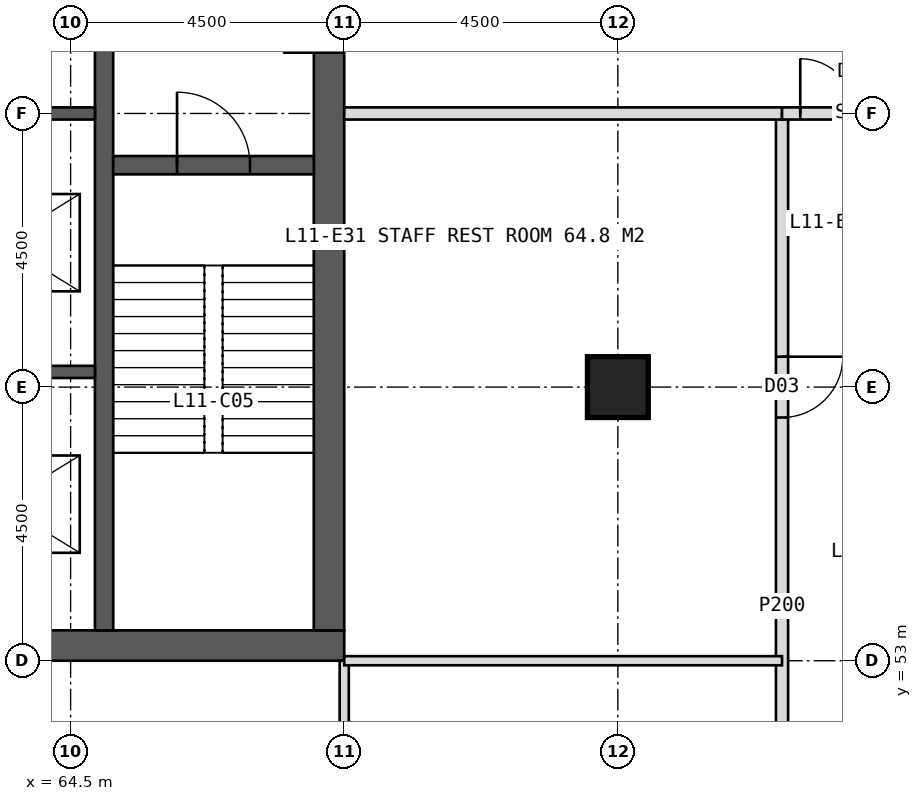
"""IFC4 building model, lengths in metres.
Left out: names, types, materials, properties, quantities, classifications, styles, units other than length and angle.
Written with IfcOpenShell. Run it as: python <this file> out.ifc"""

import sys

from ifc_helpers import new_model, si_unit, direction, frame, frame_2d, origin, origin_2d, place, context, subcontext, project, spatial, rectangle, hollow_rectangle, extrude, element, fill, save


model = new_model("IFC4")
c1 = context("Model", 3, precision=1e-05, world=origin(), true_north=direction((0.0, 1.0)))
c2 = subcontext(c1, "Body", "Model", "MODEL_VIEW")
j1 = project(units=[si_unit("LENGTHUNIT", "METRE"), si_unit("PLANEANGLEUNIT", "RADIAN")], contexts=[c1])
p1 = place(None, origin())
s1 = spatial("IfcSite", under=j1, at=p1, CompositionType="ELEMENT")
p2 = place(p1, origin())
s2 = spatial("IfcBuilding", under=s1, at=p2, CompositionType="ELEMENT")
p3 = place(p2, frame((0.0, 0.0, 51.0)))
s3 = spatial("IfcBuildingStorey", under=s2, at=p3, CompositionType="ELEMENT", Elevation=51.0)
p4 = place(p3, frame((51.0, 53.25, 0.0), z_axis=(0.0, 0.0, 1.0), x_axis=(1.0, 0.0, 0.0)))
e1 = element("IfcWall", 1, at=p4, inside=s3, PredefinedType="SHEAR", context=c2, shape_type="SweptSolid", body=[
    extrude(rectangle(XDim=18.0, YDim=0.5, at=frame_2d((9.0, 0.0))), origin(), (0.0, 0.0, 1.0), 4.0),
])
p5 = place(p4, frame((8.1, 0.0, 0.0)))
e2 = element("IfcOpeningElement", 2, at=p5, cuts=e1, PredefinedType="OPENING", context=c2, shape_type="SweptSolid", body=[
    extrude(rectangle(XDim=1.8, YDim=2.2, at=frame_2d((0.9, 1.1))), frame((0.0, 0.26, 0.0), z_axis=(0.0, -1.0, 0.0), x_axis=(1.0, 0.0, 0.0)), (0.0, 0.0, 1.0), 0.52),
])
p6 = place(p3, frame((68.75, 53.5, 0.0), z_axis=(0.0, 0.0, 1.0), x_axis=(0.0, 1.0, 0.0)))
e3 = element("IfcWall", 3, at=p6, inside=s3, PredefinedType="SHEAR", context=c2, shape_type="SweptSolid", body=[
    extrude(rectangle(XDim=17.0, YDim=0.5, at=frame_2d((8.5, 0.0))), origin(), (0.0, 0.0, 1.0), 4.0),
])
p7 = place(p6, frame((9.5, 0.0, 0.0)))
e4 = element("IfcOpeningElement", 4, at=p7, cuts=e3, PredefinedType="OPENING", context=c2, shape_type="SweptSolid", body=[
    extrude(rectangle(XDim=1.5, YDim=2.2, at=frame_2d((0.75, 1.1))), frame((0.0, 0.26, 0.0), z_axis=(0.0, -1.0, 0.0), x_axis=(1.0, 0.0, 0.0)), (0.0, 0.0, 1.0), 0.52),
])
p8 = place(p3, frame((65.05, 53.5, 0.0), z_axis=(0.0, 0.0, 1.0), x_axis=(0.0, 1.0, 0.0)))
e5 = element("IfcWall", 5, at=p8, inside=s3, PredefinedType="SHEAR", context=c2, shape_type="SweptSolid", body=[
    extrude(rectangle(XDim=17.0, YDim=0.3, at=frame_2d((8.5, 0.0))), origin(), (0.0, 0.0, 1.0), 4.0),
])
for number, where, z_axis, x_axis in (
    (6, (61.85, 57.75, 0.0), (0.0, 0.0, 1.0), (1.0, 0.0, 0.0)),
    (7, (61.85, 62.0, 0.0), (0.0, 0.0, 1.0), (1.0, 0.0, 0.0)),
):
    element("IfcWall", number, at=place(p3, frame(where, z_axis=z_axis, x_axis=x_axis)), inside=s3, PredefinedType="SHEAR", context=c2, shape_type="SweptSolid", body=[
        extrude(rectangle(XDim=3.05, YDim=0.2, at=frame_2d((1.525, 0.0))), origin(), (0.0, 0.0, 1.0), 4.0),
    ])
p9 = place(p3, frame((65.2, 61.15, 0.0), z_axis=(0.0, 0.0, 1.0), x_axis=(1.0, 0.0, 0.0)))
e8 = element("IfcWall", 8, at=p9, inside=s3, PredefinedType="SHEAR", context=c2, shape_type="SweptSolid", body=[
    extrude(rectangle(XDim=3.3, YDim=0.3, at=frame_2d((1.65, 0.0))), origin(), (0.0, 0.0, 1.0), 4.0),
])
p10 = place(p9, frame((1.05, 0.0, 0.0)))
e9 = element("IfcOpeningElement", 9, at=p10, cuts=e8, PredefinedType="OPENING", context=c2, shape_type="SweptSolid", body=[
    extrude(rectangle(XDim=1.2, YDim=2.1, at=frame_2d((0.6, 1.05))), frame((0.0, 0.16, 0.0), z_axis=(0.0, -1.0, 0.0), x_axis=(1.0, 0.0, 0.0)), (0.0, 0.0, 1.0), 0.32),
])
p11 = place(p3, frame((73.5, 57.5, 0.0), z_axis=(0.0, 0.0, 1.0), x_axis=(1.0, 0.0, 0.0)))
e10 = element("IfcColumn", 10, at=p11, inside=s3, PredefinedType="COLUMN", context=c2, shape_type="SweptSolid", body=[
    extrude(hollow_rectangle(XDim=1.0, YDim=1.0, WallThickness=0.1, at=origin_2d()), origin(), (0.0, 0.0, 1.0), 4.0),
])
p12 = place(p3, frame((69.0, 53.0, 0.0), z_axis=(0.0, 0.0, 1.0), x_axis=(0.0, -1.0, 0.0)))
e11 = element("IfcWall", 11, at=p12, inside=s3, PredefinedType="PARTITIONING", context=c2, shape_type="SweptSolid", body=[
    extrude(rectangle(XDim=7.2, YDim=0.15, at=frame_2d((3.6, 0.0))), origin(), (0.0, 0.0, 1.0), 3.75),
])
p13 = place(p3, frame((76.2, 62.0, 0.0), z_axis=(0.0, 0.0, 1.0), x_axis=(0.0, -1.0, 0.0)))
e12 = element("IfcWall", 12, at=p13, inside=s3, PredefinedType="PARTITIONING", context=c2, shape_type="SweptSolid", body=[
    extrude(rectangle(XDim=16.2, YDim=0.2, at=frame_2d((8.1, 0.0))), origin(), (0.0, 0.0, 1.0), 3.75),
])
p14 = place(p13, frame((4.0, 0.0, 0.0)))
e13 = element("IfcOpeningElement", 13, at=p14, cuts=e12, PredefinedType="OPENING", context=c2, shape_type="SweptSolid", body=[
    extrude(rectangle(XDim=1.0, YDim=2.1, at=frame_2d((0.5, 1.05))), frame((0.0, 0.11, 0.0), z_axis=(0.0, -1.0, 0.0), x_axis=(1.0, 0.0, 0.0)), (0.0, 0.0, 1.0), 0.22),
])
p15 = place(p13, frame((12.1, 0.0, 0.0)))
e14 = element("IfcOpeningElement", 14, at=p15, cuts=e12, PredefinedType="OPENING", context=c2, shape_type="SweptSolid", body=[
    extrude(rectangle(XDim=1.0, YDim=2.1, at=frame_2d((0.5, 1.05))), frame((0.0, 0.11, 0.0), z_axis=(0.0, -1.0, 0.0), x_axis=(1.0, 0.0, 0.0)), (0.0, 0.0, 1.0), 0.22),
])
p16 = place(p3, frame((69.0, 62.0, 0.0), z_axis=(0.0, 0.0, 1.0), x_axis=(1.0, 0.0, 0.0)))
e15 = element("IfcWall", 15, at=p16, inside=s3, PredefinedType="SOLIDWALL", context=c2, shape_type="SweptSolid", body=[
    extrude(rectangle(XDim=7.2, YDim=0.2, at=frame_2d((3.6, 0.0))), origin(), (0.0, 0.0, 1.0), 2.75),
])
p17 = place(p3, frame((69.0, 53.0, 0.0), z_axis=(0.0, 0.0, 1.0), x_axis=(1.0, 0.0, 0.0)))
e16 = element("IfcWall", 16, at=p17, inside=s3, PredefinedType="PARTITIONING", context=c2, shape_type="SweptSolid", body=[
    extrude(rectangle(XDim=7.2, YDim=0.15, at=frame_2d((3.6, 0.0))), origin(), (0.0, 0.0, 1.0), 3.75),
])
p18 = place(p3, frame((76.2, 62.0, 0.0), z_axis=(0.0, 0.0, 1.0), x_axis=(1.0, 0.0, 0.0)))
e17 = element("IfcWall", 17, at=p18, inside=s3, PredefinedType="SOLIDWALL", context=c2, shape_type="SweptSolid", body=[
    extrude(rectangle(XDim=2.7, YDim=0.2, at=frame_2d((1.35, 0.0))), origin(), (0.0, 0.0, 1.0), 2.75),
])
p19 = place(p18, frame((0.3, 0.0, 0.0)))
e18 = element("IfcOpeningElement", 18, at=p19, cuts=e17, PredefinedType="OPENING", context=c2, shape_type="SweptSolid", body=[
    extrude(rectangle(XDim=1.8, YDim=2.2, at=frame_2d((0.9, 1.1))), frame((0.0, 0.11, 0.0), z_axis=(0.0, -1.0, 0.0), x_axis=(1.0, 0.0, 0.0)), (0.0, 0.0, 1.0), 0.22),
])
p20 = place(p14, origin())
e19 = element("IfcDoor", 19, at=p20, inside=s3, OperationType="SINGLE_SWING_LEFT", PredefinedType="DOOR", context=c2, shape_type="SweptSolid", body=[
    extrude(rectangle(XDim=1.0, YDim=2.1, at=frame_2d((0.5, 1.05))), frame((0.0, 0.025, 0.0), z_axis=(0.0, -1.0, 0.0), x_axis=(1.0, 0.0, 0.0)), (0.0, 0.0, 1.0), 0.05),
])
fill(e13, e19)
p21 = place(p19, origin())
e20 = element("IfcDoor", 20, at=p21, inside=s3, OperationType="DOUBLE_DOOR_DOUBLE_SWING", PredefinedType="DOOR", context=c2, shape_type="SweptSolid", body=[
    extrude(rectangle(XDim=1.8, YDim=2.2, at=frame_2d((0.9, 1.1))), frame((0.0, 0.025, 0.0), z_axis=(0.0, -1.0, 0.0), x_axis=(1.0, 0.0, 0.0)), (0.0, 0.0, 1.0), 0.05),
])
fill(e18, e20)
p22 = place(p10, origin())
e21 = element("IfcDoor", 21, at=p22, inside=s3, OperationType="SINGLE_SWING_LEFT", PredefinedType="DOOR", context=c2, shape_type="SweptSolid", body=[
    extrude(rectangle(XDim=1.2, YDim=2.1, at=frame_2d((0.6, 1.05))), frame((0.0, 0.025, 0.0), z_axis=(0.0, -1.0, 0.0), x_axis=(1.0, 0.0, 0.0)), (0.0, 0.0, 1.0), 0.05),
])
fill(e9, e21)
save(model, sys.argv[1])
